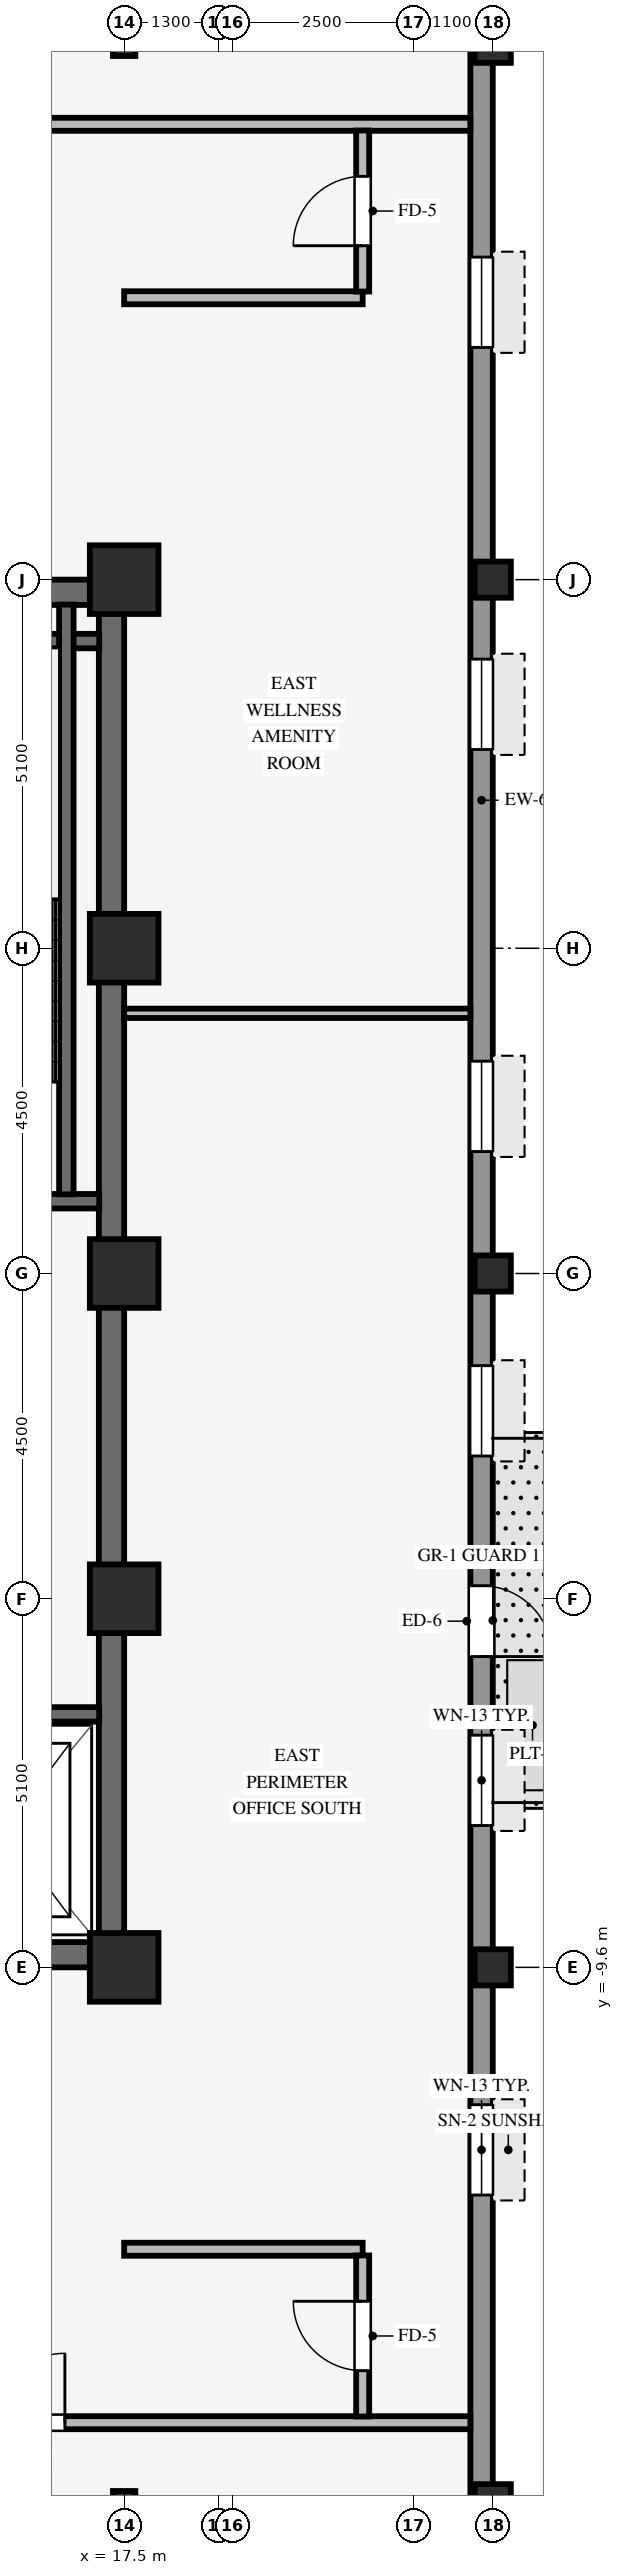
"""IFC4 building model, lengths in metres.
Left out: names, types, materials, properties, quantities, classifications, styles, units other than length and angle.
Written with IfcOpenShell. Run it as: python <this file> out.ifc"""

import sys

from ifc_helpers import new_model, si_unit, direction, frame, frame_2d, origin, origin_2d, place, context, subcontext, project, spatial, rectangle, hollow_rectangle, i_section, extrude, source, transform, mapped, element, fill, save


model = new_model("IFC4")
c1 = context("Model", 3, precision=1e-05, world=origin(), true_north=direction((0.0, 1.0)))
c2 = subcontext(c1, "Body", "Model", "MODEL_VIEW")
j1 = project(units=[si_unit("LENGTHUNIT", "METRE"), si_unit("PLANEANGLEUNIT", "RADIAN")], contexts=[c1])
p1 = place(None, origin())
s1 = spatial("IfcSite", under=j1, at=p1, CompositionType="ELEMENT")
p2 = place(p1, origin())
s2 = spatial("IfcBuilding", under=s1, at=p2, CompositionType="ELEMENT")
p3 = place(p2, frame((0.0, 0.0, 190.9)))
s3 = spatial("IfcBuildingStorey", under=s2, at=p3, CompositionType="ELEMENT", Elevation=190.9)
for number, where, z_axis, x_axis in (
    (1, (9.0, -9.425, 0.0), (0.0, 0.0, 1.0), (1.0, 0.0, 0.0)),
    (2, (9.0, 9.425, 0.0), (0.0, 0.0, 1.0), (1.0, 0.0, 0.0)),
):
    element("IfcWall", number, at=place(p3, frame(where, z_axis=z_axis, x_axis=x_axis)), inside=s3, PredefinedType="SHEAR", context=c2, shape_type="SweptSolid", body=[
        extrude(rectangle(XDim=8.5, YDim=0.35, at=frame_2d((4.25, 0.0))), origin(), (0.0, 0.0, 1.0), 3.37),
    ])
p4 = place(p3, frame((17.325, -9.255, 0.0), z_axis=(0.0, 0.0, 1.0), x_axis=(0.0, 1.0, 0.0)))
e3 = element("IfcWall", 3, at=p4, inside=s3, PredefinedType="SHEAR", context=c2, shape_type="SweptSolid", body=[
    extrude(rectangle(XDim=18.51, YDim=0.35, at=frame_2d((9.255, 0.0))), origin(), (0.0, 0.0, 1.0), 3.37),
])
for number, where, z_axis, x_axis in (
    (4, (17.5, -9.6, 0.0), (0.0, 0.0, 1.0), (1.0, 0.0, 0.0)),
    (5, (17.5, -4.5, 0.0), (0.0, 0.0, 1.0), (1.0, 0.0, 0.0)),
    (6, (17.5, 4.5, 0.0), (0.0, 0.0, 1.0), (1.0, 0.0, 0.0)),
    (7, (17.5, 9.6, 0.0), (0.0, 0.0, 1.0), (1.0, 0.0, 0.0)),
    (8, (17.5, 0.0, 0.0), (0.0, 0.0, 1.0), (1.0, 0.0, 0.0)),
):
    element("IfcColumn", number, at=place(p3, frame(where, z_axis=z_axis, x_axis=x_axis)), inside=s3, PredefinedType="COLUMN", context=c2, shape_type="SweptSolid", body=[
        extrude(rectangle(XDim=0.95, YDim=0.95, at=origin_2d()), origin(), (0.0, 0.0, 1.0), 3.37),
    ])
for number, where, z_axis, x_axis in (
    (9, (22.6, -17.0, 0.0), (0.0, 0.0, 1.0), (1.0, 0.0, 0.0)),
    (10, (22.6, -9.6, 0.0), (0.0, 0.0, 1.0), (1.0, 0.0, 0.0)),
    (11, (22.6, 0.0, 0.0), (0.0, 0.0, 1.0), (1.0, 0.0, 0.0)),
    (12, (22.6, 9.6, 0.0), (0.0, 0.0, 1.0), (1.0, 0.0, 0.0)),
    (13, (22.6, 17.0, 0.0), (0.0, 0.0, 1.0), (1.0, 0.0, 0.0)),
):
    element("IfcColumn", number, at=place(p3, frame(where, z_axis=z_axis, x_axis=x_axis)), inside=s3, PredefinedType="COLUMN", context=c2, shape_type="SweptSolid", body=[
        extrude(hollow_rectangle(XDim=0.5, YDim=0.5, WallThickness=0.032, InnerFilletRadius=0.032, OuterFilletRadius=0.064, at=origin_2d()), origin(), (0.0, 0.0, 1.0), 3.37),
    ])
for number, where, z_axis, x_axis in (
    (14, (17.5, -17.0, 0.0), (0.0, 0.0, 1.0), (1.0, 0.0, 0.0)),
    (15, (17.5, 17.0, 0.0), (0.0, 0.0, 1.0), (1.0, 0.0, 0.0)),
):
    element("IfcColumn", number, at=place(p3, frame(where, z_axis=z_axis, x_axis=x_axis)), inside=s3, PredefinedType="COLUMN", context=c2, shape_type="SweptSolid", body=[
        extrude(i_section(OverallWidth=0.31, OverallDepth=0.31, WebThickness=0.015, FlangeThickness=0.015, FilletRadius=0.015, at=origin_2d()), origin(), (0.0, 0.0, 1.0), 3.37),
    ])
p5 = place(p3, frame((22.445, -20.794, 0.0), z_axis=(0.0, 0.0, 1.0), x_axis=(0.0, 1.0, 0.0)))
e16 = element("IfcWall", 16, at=p5, inside=s3, PredefinedType="STANDARD", context=c2, shape_type="SweptSolid", body=[
    extrude(rectangle(XDim=37.788, YDim=0.31, at=frame_2d((18.894, 0.0))), origin(), (0.0, 0.0, 1.0), 2.705),
])
p6 = place(p5, frame((16.474, 0.0, 0.0), z_axis=(0.0, 0.0, 1.0), x_axis=(-1.0, 0.0, 0.0)))
e17 = element("IfcOpeningElement", 17, at=p6, cuts=e16, PredefinedType="OPENING", context=c2, shape_type="SweptSolid", body=[
    extrude(rectangle(XDim=0.98, YDim=2.15, at=frame_2d((0.49, 1.075))), frame((0.0, 0.165, 0.0), z_axis=(0.0, -1.0, 0.0), x_axis=(1.0, 0.0, 0.0)), (0.0, 0.0, 1.0), 0.33),
])
p7 = place(p5, frame((1.581, 0.0, 0.8)))
e18 = element("IfcOpeningElement", 18, at=p7, cuts=e16, PredefinedType="OPENING", context=c2, shape_type="SweptSolid", body=[
    extrude(rectangle(XDim=1.25, YDim=1.52, at=frame_2d((0.625, 0.76))), frame((0.0, 0.165, 0.0), z_axis=(0.0, -1.0, 0.0), x_axis=(1.0, 0.0, 0.0)), (0.0, 0.0, 1.0), 0.33),
])
p8 = place(p5, frame((8.044, 0.0, 0.8)))
e19 = element("IfcOpeningElement", 19, at=p8, cuts=e16, PredefinedType="OPENING", context=c2, shape_type="SweptSolid", body=[
    extrude(rectangle(XDim=1.25, YDim=1.52, at=frame_2d((0.625, 0.76))), frame((0.0, 0.165, 0.0), z_axis=(0.0, -1.0, 0.0), x_axis=(1.0, 0.0, 0.0)), (0.0, 0.0, 1.0), 0.33),
])
p9 = place(p5, frame((13.156, 0.0, 0.8)))
e20 = element("IfcOpeningElement", 20, at=p9, cuts=e16, PredefinedType="OPENING", context=c2, shape_type="SweptSolid", body=[
    extrude(rectangle(XDim=1.25, YDim=1.52, at=frame_2d((0.625, 0.76))), frame((0.0, 0.165, 0.0), z_axis=(0.0, -1.0, 0.0), x_axis=(1.0, 0.0, 0.0)), (0.0, 0.0, 1.0), 0.33),
])
p10 = place(p5, frame((18.269, 0.0, 0.8)))
e21 = element("IfcOpeningElement", 21, at=p10, cuts=e16, PredefinedType="OPENING", context=c2, shape_type="SweptSolid", body=[
    extrude(rectangle(XDim=1.25, YDim=1.52, at=frame_2d((0.625, 0.76))), frame((0.0, 0.165, 0.0), z_axis=(0.0, -1.0, 0.0), x_axis=(1.0, 0.0, 0.0)), (0.0, 0.0, 1.0), 0.33),
])
p11 = place(p5, frame((22.482, 0.0, 0.8)))
e22 = element("IfcOpeningElement", 22, at=p11, cuts=e16, PredefinedType="OPENING", context=c2, shape_type="SweptSolid", body=[
    extrude(rectangle(XDim=1.25, YDim=1.52, at=frame_2d((0.625, 0.76))), frame((0.0, 0.165, 0.0), z_axis=(0.0, -1.0, 0.0), x_axis=(1.0, 0.0, 0.0)), (0.0, 0.0, 1.0), 0.33),
])
p12 = place(p5, frame((28.044, 0.0, 0.8)))
e23 = element("IfcOpeningElement", 23, at=p12, cuts=e16, PredefinedType="OPENING", context=c2, shape_type="SweptSolid", body=[
    extrude(rectangle(XDim=1.25, YDim=1.52, at=frame_2d((0.625, 0.76))), frame((0.0, 0.165, 0.0), z_axis=(0.0, -1.0, 0.0), x_axis=(1.0, 0.0, 0.0)), (0.0, 0.0, 1.0), 0.33),
])
p13 = place(p5, frame((33.607, 0.0, 0.8)))
e24 = element("IfcOpeningElement", 24, at=p13, cuts=e16, PredefinedType="OPENING", context=c2, shape_type="SweptSolid", body=[
    extrude(rectangle(XDim=1.25, YDim=1.52, at=frame_2d((0.625, 0.76))), frame((0.0, 0.165, 0.0), z_axis=(0.0, -1.0, 0.0), x_axis=(1.0, 0.0, 0.0)), (0.0, 0.0, 1.0), 0.33),
])
for number, where, z_axis, x_axis in (
    (25, (13.535, 1.0, 0.0), (0.0, 0.0, 1.0), (1.0, 0.0, 0.0)),
    (26, (13.535, 8.75, 0.0), (0.0, 0.0, 1.0), (1.0, 0.0, 0.0)),
):
    element("IfcWall", number, at=place(p3, frame(where, z_axis=z_axis, x_axis=x_axis)), inside=s3, PredefinedType="SHEAR", context=c2, shape_type="SweptSolid", body=[
        extrude(rectangle(XDim=3.62, YDim=0.2, at=frame_2d((1.81, 0.0))), origin(), (0.0, 0.0, 1.0), 3.37),
    ])
p14 = place(p3, frame((16.7, 1.095, 0.0), z_axis=(0.0, 0.0, 1.0), x_axis=(0.0, 1.0, 0.0)))
e27 = element("IfcWall", 27, at=p14, inside=s3, PredefinedType="SHEAR", context=c2, shape_type="SweptSolid", body=[
    extrude(rectangle(XDim=8.16, YDim=0.2, at=frame_2d((4.08, 0.0))), origin(), (0.0, 0.0, 1.0), 3.37),
])
p15 = place(p3, frame((14.645, -6.1, 0.0), z_axis=(0.0, 0.0, 1.0), x_axis=(1.0, 0.0, 0.0)))
e28 = element("IfcWall", 28, at=p15, inside=s3, PredefinedType="SHEAR", context=c2, shape_type="SweptSolid", body=[
    extrude(rectangle(XDim=2.51, YDim=0.2, at=frame_2d((1.255, 0.0))), origin(), (0.0, 0.0, 1.0), 3.37),
])
p16 = place(p3, frame((-26.09, -15.9, 0.0), z_axis=(0.0, 0.0, 1.0), x_axis=(1.0, 0.0, 0.0)))
e29 = element("IfcWall", 29, at=p16, inside=s3, PredefinedType="PARTITIONING", context=c2, shape_type="SweptSolid", body=[
    extrude(rectangle(XDim=48.38, YDim=0.18, at=frame_2d((24.19, 0.0))), origin(), (0.0, 0.0, 1.0), 3.36),
])
p17 = place(p16, frame((41.81, 0.0, 0.0)))
e30 = element("IfcOpeningElement", 30, at=p17, cuts=e29, PredefinedType="OPENING", context=c2, shape_type="SweptSolid", body=[
    extrude(rectangle(XDim=0.96, YDim=2.1, at=frame_2d((0.48, 1.05))), frame((0.0, 0.1, 0.0), z_axis=(0.0, -1.0, 0.0), x_axis=(1.0, 0.0, 0.0)), (0.0, 0.0, 1.0), 0.2),
])
p18 = place(p16, frame((17.985, 0.0, 0.0)))
e31 = element("IfcOpeningElement", 31, at=p18, cuts=e29, PredefinedType="OPENING", context=c2, shape_type="SweptSolid", body=[
    extrude(rectangle(XDim=0.96, YDim=2.1, at=frame_2d((0.48, 1.05))), frame((0.0, 0.1, 0.0), z_axis=(0.0, -1.0, 0.0), x_axis=(1.0, 0.0, 0.0)), (0.0, 0.0, 1.0), 0.2),
])
p19 = place(p16, frame((26.55, 0.0, 0.0)))
e32 = element("IfcOpeningElement", 32, at=p19, cuts=e29, PredefinedType="OPENING", context=c2, shape_type="SweptSolid", body=[
    extrude(rectangle(XDim=0.96, YDim=2.1, at=frame_2d((0.48, 1.05))), frame((0.0, 0.1, 0.0), z_axis=(0.0, -1.0, 0.0), x_axis=(1.0, 0.0, 0.0)), (0.0, 0.0, 1.0), 0.2),
])
p20 = place(p16, frame((10.935, 0.0, 0.0)))
e33 = element("IfcOpeningElement", 33, at=p20, cuts=e29, PredefinedType="OPENING", context=c2, shape_type="SweptSolid", body=[
    extrude(rectangle(XDim=0.96, YDim=2.1, at=frame_2d((0.48, 1.05))), frame((0.0, 0.1, 0.0), z_axis=(0.0, -1.0, 0.0), x_axis=(1.0, 0.0, 0.0)), (0.0, 0.0, 1.0), 0.2),
])
p21 = place(p16, frame((35.91, 0.0, 0.0)))
e34 = element("IfcOpeningElement", 34, at=p21, cuts=e29, PredefinedType="OPENING", context=c2, shape_type="SweptSolid", body=[
    extrude(rectangle(XDim=0.96, YDim=2.1, at=frame_2d((0.48, 1.05))), frame((0.0, 0.1, 0.0), z_axis=(0.0, -1.0, 0.0), x_axis=(1.0, 0.0, 0.0)), (0.0, 0.0, 1.0), 0.2),
])
p22 = place(p16, frame((2.465, 0.0, 0.0)))
e35 = element("IfcOpeningElement", 35, at=p22, cuts=e29, PredefinedType="OPENING", context=c2, shape_type="SweptSolid", body=[
    extrude(rectangle(XDim=0.96, YDim=2.1, at=frame_2d((0.48, 1.05))), frame((0.0, 0.1, 0.0), z_axis=(0.0, -1.0, 0.0), x_axis=(1.0, 0.0, 0.0)), (0.0, 0.0, 1.0), 0.2),
])
p23 = place(p3, frame((17.5, -13.5, 0.0), z_axis=(0.0, 0.0, 1.0), x_axis=(1.0, 0.0, 0.0)))
e36 = element("IfcWall", 36, at=p23, inside=s3, PredefinedType="PARTITIONING", context=c2, shape_type="SweptSolid", body=[
    extrude(rectangle(XDim=3.3, YDim=0.18, at=frame_2d((1.65, 0.0))), origin(), (0.0, 0.0, 1.0), 3.008),
])
p24 = place(p3, frame((17.5, 3.6, 0.0), z_axis=(0.0, 0.0, 1.0), x_axis=(1.0, 0.0, 0.0)))
e37 = element("IfcWall", 37, at=p24, inside=s3, PredefinedType="PARTITIONING", context=c2, shape_type="SweptSolid", body=[
    extrude(rectangle(XDim=4.79, YDim=0.13, at=frame_2d((2.395, 0.0))), origin(), (0.0, 0.0, 1.0), 3.36),
])
p25 = place(p3, frame((17.5, 13.5, 0.0), z_axis=(0.0, 0.0, 1.0), x_axis=(1.0, 0.0, 0.0)))
e38 = element("IfcWall", 38, at=p25, inside=s3, PredefinedType="PARTITIONING", context=c2, shape_type="SweptSolid", body=[
    extrude(rectangle(XDim=3.3, YDim=0.18, at=frame_2d((1.65, 0.0))), origin(), (0.0, 0.0, 1.0), 3.008),
])
p26 = place(p3, frame((-26.09, 15.9, 0.0), z_axis=(0.0, 0.0, 1.0), x_axis=(1.0, 0.0, 0.0)))
e39 = element("IfcWall", 39, at=p26, inside=s3, PredefinedType="PARTITIONING", context=c2, shape_type="SweptSolid", body=[
    extrude(rectangle(XDim=48.38, YDim=0.18, at=frame_2d((24.19, 0.0))), origin(), (0.0, 0.0, 1.0), 3.36),
])
p27 = place(p26, frame((14.29, 0.0, 0.0)))
e40 = element("IfcOpeningElement", 40, at=p27, cuts=e39, PredefinedType="OPENING", context=c2, shape_type="SweptSolid", body=[
    extrude(rectangle(XDim=0.96, YDim=2.1, at=frame_2d((0.48, 1.05))), frame((0.0, 0.1, 0.0), z_axis=(0.0, -1.0, 0.0), x_axis=(1.0, 0.0, 0.0)), (0.0, 0.0, 1.0), 0.2),
])
p28 = place(p26, frame((40.51, 0.0, 0.0)))
e41 = element("IfcOpeningElement", 41, at=p28, cuts=e39, PredefinedType="OPENING", context=c2, shape_type="SweptSolid", body=[
    extrude(rectangle(XDim=0.96, YDim=2.1, at=frame_2d((0.48, 1.05))), frame((0.0, 0.1, 0.0), z_axis=(0.0, -1.0, 0.0), x_axis=(1.0, 0.0, 0.0)), (0.0, 0.0, 1.0), 0.2),
])
p29 = place(p3, frame((20.8, -15.814, 0.0), z_axis=(0.0, 0.0, 1.0), x_axis=(0.0, 1.0, 0.0)))
e42 = element("IfcWall", 42, at=p29, inside=s3, PredefinedType="PARTITIONING", context=c2, shape_type="SweptSolid", body=[
    extrude(rectangle(XDim=2.228, YDim=0.18, at=frame_2d((1.114, 0.0))), origin(), (0.0, 0.0, 1.0), 3.36),
])
p30 = place(p29, frame((0.634, 0.0, 0.0)))
e43 = element("IfcOpeningElement", 43, at=p30, cuts=e42, PredefinedType="OPENING", context=c2, shape_type="SweptSolid", body=[
    extrude(rectangle(XDim=0.96, YDim=2.1, at=frame_2d((0.48, 1.05))), frame((0.0, 0.1, 0.0), z_axis=(0.0, -1.0, 0.0), x_axis=(1.0, 0.0, 0.0)), (0.0, 0.0, 1.0), 0.2),
])
p31 = place(p3, frame((20.8, 13.586, 0.0), z_axis=(0.0, 0.0, 1.0), x_axis=(0.0, 1.0, 0.0)))
e44 = element("IfcWall", 44, at=p31, inside=s3, PredefinedType="PARTITIONING", context=c2, shape_type="SweptSolid", body=[
    extrude(rectangle(XDim=2.228, YDim=0.18, at=frame_2d((1.114, 0.0))), origin(), (0.0, 0.0, 1.0), 3.36),
])
p32 = place(p31, frame((0.634, 0.0, 0.0)))
e45 = element("IfcOpeningElement", 45, at=p32, cuts=e44, PredefinedType="OPENING", context=c2, shape_type="SweptSolid", body=[
    extrude(rectangle(XDim=0.96, YDim=2.1, at=frame_2d((0.48, 1.05))), frame((0.0, 0.1, 0.0), z_axis=(0.0, -1.0, 0.0), x_axis=(1.0, 0.0, 0.0)), (0.0, 0.0, 1.0), 0.2),
])
m1 = source(origin(), c2, "Body", "SweptSolid", [
    extrude(rectangle(XDim=0.98, YDim=2.15, at=frame_2d((0.49, 1.075))), frame((0.0, 0.025, 0.0), z_axis=(0.0, -1.0, 0.0), x_axis=(1.0, 0.0, 0.0)), (0.0, 0.0, 1.0), 0.05),
])
p33 = place(p6, origin())
e46 = element("IfcDoor", 46, at=p33, inside=s3, OperationType="SINGLE_SWING_RIGHT", PredefinedType="DOOR", context=c2, shape_type="MappedRepresentation", body=[
    mapped(m1, transform((0.0, 0.0, 0.0), scale=1.0)),
])
fill(e17, e46)
m2 = source(origin(), c2, "Body", "SweptSolid", [
    extrude(rectangle(XDim=1.25, YDim=1.52, at=frame_2d((0.625, 0.76))), frame((0.0, 0.03, 0.0), z_axis=(0.0, -1.0, 0.0), x_axis=(1.0, 0.0, 0.0)), (0.0, 0.0, 1.0), 0.06),
])
p34 = place(p8, origin())
e47 = element("IfcWindow", 47, at=p34, inside=s3, PartitioningType="SINGLE_PANEL", PredefinedType="WINDOW", context=c2, shape_type="MappedRepresentation", body=[
    mapped(m2, transform((0.0, 0.0, 0.0), scale=1.0)),
])
fill(e19, e47)
p35 = place(p9, origin())
e48 = element("IfcWindow", 48, at=p35, inside=s3, PartitioningType="SINGLE_PANEL", PredefinedType="WINDOW", context=c2, shape_type="MappedRepresentation", body=[
    mapped(m2, transform((0.0, 0.0, 0.0), scale=1.0)),
])
fill(e20, e48)
p36 = place(p10, origin())
e49 = element("IfcWindow", 49, at=p36, inside=s3, PartitioningType="SINGLE_PANEL", PredefinedType="WINDOW", context=c2, shape_type="MappedRepresentation", body=[
    mapped(m2, transform((0.0, 0.0, 0.0), scale=1.0)),
])
fill(e21, e49)
p37 = place(p11, origin())
e50 = element("IfcWindow", 50, at=p37, inside=s3, PartitioningType="SINGLE_PANEL", PredefinedType="WINDOW", context=c2, shape_type="MappedRepresentation", body=[
    mapped(m2, transform((0.0, 0.0, 0.0), scale=1.0)),
])
fill(e22, e50)
p38 = place(p12, origin())
e51 = element("IfcWindow", 51, at=p38, inside=s3, PartitioningType="SINGLE_PANEL", PredefinedType="WINDOW", context=c2, shape_type="MappedRepresentation", body=[
    mapped(m2, transform((0.0, 0.0, 0.0), scale=1.0)),
])
fill(e23, e51)
p39 = place(p13, origin())
e52 = element("IfcWindow", 52, at=p39, inside=s3, PartitioningType="SINGLE_PANEL", PredefinedType="WINDOW", context=c2, shape_type="MappedRepresentation", body=[
    mapped(m2, transform((0.0, 0.0, 0.0), scale=1.0)),
])
fill(e24, e52)
m3 = source(origin(), c2, "Body", "SweptSolid", [
    extrude(rectangle(XDim=0.96, YDim=2.1, at=frame_2d((0.48, 1.05))), frame((0.0, 0.025, 0.0), z_axis=(0.0, -1.0, 0.0), x_axis=(1.0, 0.0, 0.0)), (0.0, 0.0, 1.0), 0.05),
])
p40 = place(p17, origin())
e53 = element("IfcDoor", 53, at=p40, inside=s3, OperationType="SINGLE_SWING_RIGHT", PredefinedType="DOOR", context=c2, shape_type="MappedRepresentation", body=[
    mapped(m3, transform((0.0, 0.0, 0.0), scale=1.0)),
])
fill(e30, e53)
p41 = place(p30, origin())
e54 = element("IfcDoor", 54, at=p41, inside=s3, OperationType="SINGLE_SWING_RIGHT", PredefinedType="DOOR", context=c2, shape_type="MappedRepresentation", body=[
    mapped(m3, transform((0.0, 0.0, 0.0), scale=1.0)),
])
fill(e43, e54)
p42 = place(p32, origin())
e55 = element("IfcDoor", 55, at=p42, inside=s3, OperationType="SINGLE_SWING_LEFT", PredefinedType="DOOR", context=c2, shape_type="MappedRepresentation", body=[
    mapped(m3, transform((0.0, 0.0, 0.0), scale=1.0)),
])
fill(e45, e55)
save(model, sys.argv[1])
